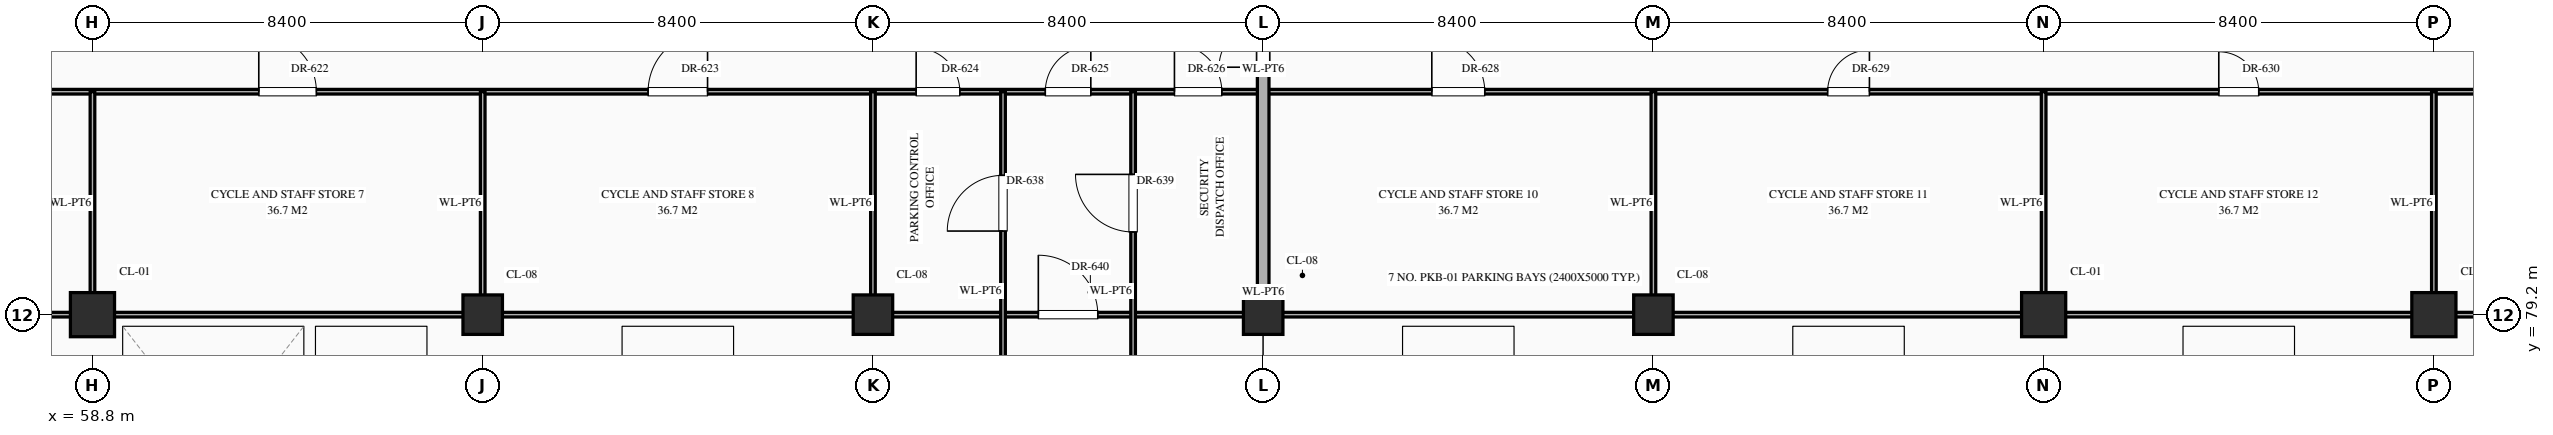
"""IFC4 building model, lengths in metres.
Left out: names, types, materials, properties, quantities, classifications, styles, units other than length and angle.
Written with IfcOpenShell. Run it as: python <this file> out.ifc"""

import sys

from ifc_helpers import new_model, si_unit, direction, frame, frame_2d, origin, origin_2d, place, context, subcontext, project, spatial, rectangle, circle, extrude, element, fill, save


model = new_model("IFC4")
c1 = context("Model", 3, precision=1e-05, world=origin(), true_north=direction((0.0, 1.0)))
c2 = subcontext(c1, "Body", "Model", "MODEL_VIEW")
j1 = project(units=[si_unit("LENGTHUNIT", "METRE"), si_unit("PLANEANGLEUNIT", "RADIAN")], contexts=[c1])
p1 = place(None, origin())
s1 = spatial("IfcSite", under=j1, at=p1, CompositionType="ELEMENT")
p2 = place(p1, origin())
s2 = spatial("IfcBuilding", under=s1, at=p2, CompositionType="ELEMENT")
p3 = place(p2, frame((0.0, 0.0, -5.4)))
s3 = spatial("IfcBuildingStorey", under=s2, at=p3, CompositionType="ELEMENT", Elevation=-5.4)
p4 = place(p3, frame((58.8, 79.2, 0.0), z_axis=(0.0, 0.0, 1.0), x_axis=(1.0, 0.0, 0.0)))
e1 = element("IfcColumn", 1, at=p4, inside=s3, PredefinedType="COLUMN", context=c2, shape_type="SweptSolid", body=[
    extrude(rectangle(XDim=0.95, YDim=0.95, at=origin_2d()), origin(), (0.0, 0.0, 1.0), 5.4),
])
for number, where, z_axis, x_axis in (
    (2, (67.2, 79.2, 0.0), (0.0, 0.0, 1.0), (1.0, 0.0, 0.0)),
    (3, (75.6, 79.2, 0.0), (0.0, 0.0, 1.0), (1.0, 0.0, 0.0)),
    (4, (84.0, 79.2, 0.0), (0.0, 0.0, 1.0), (1.0, 0.0, 0.0)),
    (5, (92.4, 79.2, 0.0), (0.0, 0.0, 1.0), (1.0, 0.0, 0.0)),
):
    element("IfcColumn", number, at=place(p3, frame(where, z_axis=z_axis, x_axis=x_axis)), inside=s3, PredefinedType="COLUMN", context=c2, shape_type="SweptSolid", body=[
        extrude(circle(Radius=0.425, at=origin_2d()), origin(), (0.0, 0.0, 1.0), 5.4),
    ])
for number, where, z_axis, x_axis in (
    (6, (100.8, 79.2, 0.0), (0.0, 0.0, 1.0), (1.0, 0.0, 0.0)),
    (7, (109.2, 79.2, 0.0), (0.0, 0.0, 1.0), (1.0, 0.0, 0.0)),
):
    element("IfcColumn", number, at=place(p3, frame(where, z_axis=z_axis, x_axis=x_axis)), inside=s3, PredefinedType="COLUMN", context=c2, shape_type="SweptSolid", body=[
        extrude(rectangle(XDim=0.95, YDim=0.95, at=origin_2d()), origin(), (0.0, 0.0, 1.0), 5.4),
    ])
p5 = place(p3, frame((50.4, 79.2, 0.0), z_axis=(0.0, 0.0, 1.0), x_axis=(1.0, 0.0, 0.0)))
e8 = element("IfcWall", 8, at=p5, inside=s3, PredefinedType="STANDARD", context=c2, shape_type="SweptSolid", body=[
    extrude(rectangle(XDim=100.8, YDim=0.1, at=frame_2d((50.4, 0.0))), origin(), (0.0, 0.0, 1.0), 4.13),
])
p6 = place(p5, frame((28.76, 0.0, 0.0)))
e9 = element("IfcOpeningElement", 9, at=p6, cuts=e8, PredefinedType="OPENING", context=c2, shape_type="SweptSolid", body=[
    extrude(rectangle(XDim=1.28, YDim=2.35, at=frame_2d((0.64, 1.175))), frame((0.0, 0.062, 0.0), z_axis=(0.0, -1.0, 0.0), x_axis=(1.0, 0.0, 0.0)), (0.0, 0.0, 1.0), 0.124),
])
p7 = place(p3, frame((33.6, 84.0, 0.0), z_axis=(0.0, 0.0, 1.0), x_axis=(1.0, 0.0, 0.0)))
e10 = element("IfcWall", 10, at=p7, inside=s3, PredefinedType="STANDARD", context=c2, shape_type="SweptSolid", body=[
    extrude(rectangle(XDim=117.6, YDim=0.1, at=frame_2d((58.8, 0.0))), origin(), (0.0, 0.0, 1.0), 5.1),
])
p8 = place(p7, frame((3.66, 0.0, 0.0)))
e11 = element("IfcOpeningElement", 11, at=p8, cuts=e10, PredefinedType="OPENING", context=c2, shape_type="SweptSolid", body=[
    extrude(rectangle(XDim=1.08, YDim=2.25, at=frame_2d((0.54, 1.125))), frame((0.0, 0.062, 0.0), z_axis=(0.0, -1.0, 0.0), x_axis=(1.0, 0.0, 0.0)), (0.0, 0.0, 1.0), 0.124),
])
p9 = place(p7, frame((12.04, 0.0, 0.0)))
e12 = element("IfcOpeningElement", 12, at=p9, cuts=e10, PredefinedType="OPENING", context=c2, shape_type="SweptSolid", body=[
    extrude(rectangle(XDim=1.12, YDim=2.25, at=frame_2d((0.56, 1.125))), frame((0.0, 0.062, 0.0), z_axis=(0.0, -1.0, 0.0), x_axis=(1.0, 0.0, 0.0)), (0.0, 0.0, 1.0), 0.124),
])
p10 = place(p7, frame((20.4, 0.0, 0.0)))
e13 = element("IfcOpeningElement", 13, at=p10, cuts=e10, PredefinedType="OPENING", context=c2, shape_type="SweptSolid", body=[
    extrude(rectangle(XDim=1.2, YDim=2.35, at=frame_2d((0.6, 1.175))), frame((0.0, 0.062, 0.0), z_axis=(0.0, -1.0, 0.0), x_axis=(1.0, 0.0, 0.0)), (0.0, 0.0, 1.0), 0.124),
])
p11 = place(p7, frame((28.78, 0.0, 0.0)))
e14 = element("IfcOpeningElement", 14, at=p11, cuts=e10, PredefinedType="OPENING", context=c2, shape_type="SweptSolid", body=[
    extrude(rectangle(XDim=1.24, YDim=2.3, at=frame_2d((0.62, 1.15))), frame((0.0, 0.062, 0.0), z_axis=(0.0, -1.0, 0.0), x_axis=(1.0, 0.0, 0.0)), (0.0, 0.0, 1.0), 0.124),
])
p12 = place(p7, frame((37.16, 0.0, 0.0)))
e15 = element("IfcOpeningElement", 15, at=p12, cuts=e10, PredefinedType="OPENING", context=c2, shape_type="SweptSolid", body=[
    extrude(rectangle(XDim=1.28, YDim=2.35, at=frame_2d((0.64, 1.175))), frame((0.0, 0.062, 0.0), z_axis=(0.0, -1.0, 0.0), x_axis=(1.0, 0.0, 0.0)), (0.0, 0.0, 1.0), 0.124),
])
p13 = place(p7, frame((42.93, 0.0, 0.0)))
e16 = element("IfcOpeningElement", 16, at=p13, cuts=e10, PredefinedType="OPENING", context=c2, shape_type="SweptSolid", body=[
    extrude(rectangle(XDim=0.94, YDim=2.3, at=frame_2d((0.47, 1.15))), frame((0.0, 0.062, 0.0), z_axis=(0.0, -1.0, 0.0), x_axis=(1.0, 0.0, 0.0)), (0.0, 0.0, 1.0), 0.124),
])
p14 = place(p7, frame((45.71, 0.0, 0.0)))
e17 = element("IfcOpeningElement", 17, at=p14, cuts=e10, PredefinedType="OPENING", context=c2, shape_type="SweptSolid", body=[
    extrude(rectangle(XDim=0.98, YDim=2.35, at=frame_2d((0.49, 1.175))), frame((0.0, 0.062, 0.0), z_axis=(0.0, -1.0, 0.0), x_axis=(1.0, 0.0, 0.0)), (0.0, 0.0, 1.0), 0.124),
])
p15 = place(p7, frame((48.49, 0.0, 0.0)))
e18 = element("IfcOpeningElement", 18, at=p15, cuts=e10, PredefinedType="OPENING", context=c2, shape_type="SweptSolid", body=[
    extrude(rectangle(XDim=1.02, YDim=2.4, at=frame_2d((0.51, 1.2))), frame((0.0, 0.062, 0.0), z_axis=(0.0, -1.0, 0.0), x_axis=(1.0, 0.0, 0.0)), (0.0, 0.0, 1.0), 0.124),
])
p16 = place(p7, frame((54.03, 0.0, 0.0)))
e19 = element("IfcOpeningElement", 19, at=p16, cuts=e10, PredefinedType="OPENING", context=c2, shape_type="SweptSolid", body=[
    extrude(rectangle(XDim=1.14, YDim=2.4, at=frame_2d((0.57, 1.2))), frame((0.0, 0.062, 0.0), z_axis=(0.0, -1.0, 0.0), x_axis=(1.0, 0.0, 0.0)), (0.0, 0.0, 1.0), 0.124),
])
p17 = place(p7, frame((62.55, 0.0, 0.0)))
e20 = element("IfcOpeningElement", 20, at=p17, cuts=e10, PredefinedType="OPENING", context=c2, shape_type="SweptSolid", body=[
    extrude(rectangle(XDim=0.9, YDim=2.15, at=frame_2d((0.45, 1.075))), frame((0.0, 0.062, 0.0), z_axis=(0.0, -1.0, 0.0), x_axis=(1.0, 0.0, 0.0)), (0.0, 0.0, 1.0), 0.124),
])
p18 = place(p7, frame((70.97, 0.0, 0.0)))
e21 = element("IfcOpeningElement", 21, at=p18, cuts=e10, PredefinedType="OPENING", context=c2, shape_type="SweptSolid", body=[
    extrude(rectangle(XDim=0.86, YDim=2.1, at=frame_2d((0.43, 1.05))), frame((0.0, 0.062, 0.0), z_axis=(0.0, -1.0, 0.0), x_axis=(1.0, 0.0, 0.0)), (0.0, 0.0, 1.0), 0.124),
])
p19 = place(p7, frame((79.34, 0.0, 0.0)))
e22 = element("IfcOpeningElement", 22, at=p19, cuts=e10, PredefinedType="OPENING", context=c2, shape_type="SweptSolid", body=[
    extrude(rectangle(XDim=0.92, YDim=2.15, at=frame_2d((0.46, 1.075))), frame((0.0, 0.062, 0.0), z_axis=(0.0, -1.0, 0.0), x_axis=(1.0, 0.0, 0.0)), (0.0, 0.0, 1.0), 0.124),
])
p20 = place(p7, frame((87.72, 0.0, 0.0)))
e23 = element("IfcOpeningElement", 23, at=p20, cuts=e10, PredefinedType="OPENING", context=c2, shape_type="SweptSolid", body=[
    extrude(rectangle(XDim=0.96, YDim=2.2, at=frame_2d((0.48, 1.1))), frame((0.0, 0.062, 0.0), z_axis=(0.0, -1.0, 0.0), x_axis=(1.0, 0.0, 0.0)), (0.0, 0.0, 1.0), 0.124),
])
p21 = place(p7, frame((96.1, 0.0, 0.0)))
e24 = element("IfcOpeningElement", 24, at=p21, cuts=e10, PredefinedType="OPENING", context=c2, shape_type="SweptSolid", body=[
    extrude(rectangle(XDim=1.0, YDim=2.25, at=frame_2d((0.5, 1.125))), frame((0.0, 0.062, 0.0), z_axis=(0.0, -1.0, 0.0), x_axis=(1.0, 0.0, 0.0)), (0.0, 0.0, 1.0), 0.124),
])
p22 = place(p7, frame((104.48, 0.0, 0.0)))
e25 = element("IfcOpeningElement", 25, at=p22, cuts=e10, PredefinedType="OPENING", context=c2, shape_type="SweptSolid", body=[
    extrude(rectangle(XDim=1.04, YDim=2.2, at=frame_2d((0.52, 1.1))), frame((0.0, 0.062, 0.0), z_axis=(0.0, -1.0, 0.0), x_axis=(1.0, 0.0, 0.0)), (0.0, 0.0, 1.0), 0.124),
])
p23 = place(p7, frame((112.86, 0.0, 0.0)))
e26 = element("IfcOpeningElement", 26, at=p23, cuts=e10, PredefinedType="OPENING", context=c2, shape_type="SweptSolid", body=[
    extrude(rectangle(XDim=1.08, YDim=2.25, at=frame_2d((0.54, 1.125))), frame((0.0, 0.062, 0.0), z_axis=(0.0, -1.0, 0.0), x_axis=(1.0, 0.0, 0.0)), (0.0, 0.0, 1.0), 0.124),
])
for number, where, z_axis, x_axis in (
    (27, (58.8, 79.2, 0.0), (0.0, 0.0, 1.0), (0.0, 1.0, 0.0)),
    (28, (67.2, 79.2, 0.0), (0.0, 0.0, 1.0), (0.0, 1.0, 0.0)),
    (29, (75.6, 79.2, 0.0), (0.0, 0.0, 1.0), (0.0, 1.0, 0.0)),
):
    element("IfcWall", number, at=place(p3, frame(where, z_axis=z_axis, x_axis=x_axis)), inside=s3, PredefinedType="STANDARD", context=c2, shape_type="SweptSolid", body=[
        extrude(rectangle(XDim=4.8, YDim=0.1, at=frame_2d((2.4, 0.0))), origin(), (0.0, 0.0, 1.0), 4.35),
    ])
p24 = place(p3, frame((78.4, 0.04, 0.0), z_axis=(0.0, 0.0, 1.0), x_axis=(0.0, 1.0, 0.0)))
e30 = element("IfcWall", 30, at=p24, inside=s3, PredefinedType="STANDARD", context=c2, shape_type="SweptSolid", body=[
    extrude(rectangle(XDim=83.96, YDim=0.1, at=frame_2d((41.98, 0.0))), origin(), (0.0, 0.0, 1.0), 4.98),
])
p25 = place(p24, frame((80.96, 0.0, 0.0)))
e31 = element("IfcOpeningElement", 31, at=p25, cuts=e30, PredefinedType="OPENING", context=c2, shape_type="SweptSolid", body=[
    extrude(rectangle(XDim=1.2, YDim=2.35, at=frame_2d((0.6, 1.175))), frame((0.0, 0.062, 0.0), z_axis=(0.0, -1.0, 0.0), x_axis=(1.0, 0.0, 0.0)), (0.0, 0.0, 1.0), 0.124),
])
p26 = place(p24, frame((41.49, 0.0, 0.0)))
e32 = element("IfcOpeningElement", 32, at=p26, cuts=e30, PredefinedType="OPENING", context=c2, shape_type="SweptSolid", body=[
    extrude(rectangle(XDim=0.94, YDim=2.3, at=frame_2d((0.47, 1.15))), frame((0.0, 0.062, 0.0), z_axis=(0.0, -1.0, 0.0), x_axis=(1.0, 0.0, 0.0)), (0.0, 0.0, 1.0), 0.124),
])
p27 = place(p24, frame((17.47, 0.0, 0.0)))
e33 = element("IfcOpeningElement", 33, at=p27, cuts=e30, PredefinedType="OPENING", context=c2, shape_type="SweptSolid", body=[
    extrude(rectangle(XDim=1.02, YDim=2.4, at=frame_2d((0.51, 1.2))), frame((0.0, 0.062, 0.0), z_axis=(0.0, -1.0, 0.0), x_axis=(1.0, 0.0, 0.0)), (0.0, 0.0, 1.0), 0.124),
])
p28 = place(p24, frame((37.83, 0.0, 0.0)))
e34 = element("IfcOpeningElement", 34, at=p28, cuts=e30, PredefinedType="OPENING", context=c2, shape_type="SweptSolid", body=[
    extrude(rectangle(XDim=1.06, YDim=2.4, at=frame_2d((0.53, 1.2))), frame((0.0, 0.062, 0.0), z_axis=(0.0, -1.0, 0.0), x_axis=(1.0, 0.0, 0.0)), (0.0, 0.0, 1.0), 0.124),
])
p29 = place(p24, frame((60.73, 0.0, 0.0)))
e35 = element("IfcOpeningElement", 35, at=p29, cuts=e30, PredefinedType="OPENING", context=c2, shape_type="SweptSolid", body=[
    extrude(rectangle(XDim=0.86, YDim=2.1, at=frame_2d((0.43, 1.05))), frame((0.0, 0.062, 0.0), z_axis=(0.0, -1.0, 0.0), x_axis=(1.0, 0.0, 0.0)), (0.0, 0.0, 1.0), 0.124),
])
p30 = place(p3, frame((81.2, 0.04, 0.0), z_axis=(0.0, 0.0, 1.0), x_axis=(0.0, 1.0, 0.0)))
e36 = element("IfcWall", 36, at=p30, inside=s3, PredefinedType="STANDARD", context=c2, shape_type="SweptSolid", body=[
    extrude(rectangle(XDim=83.96, YDim=0.1, at=frame_2d((41.98, 0.0))), origin(), (0.0, 0.0, 1.0), 4.98),
])
p31 = place(p30, frame((80.94, 0.0, 0.0)))
e37 = element("IfcOpeningElement", 37, at=p31, cuts=e36, PredefinedType="OPENING", context=c2, shape_type="SweptSolid", body=[
    extrude(rectangle(XDim=1.24, YDim=2.3, at=frame_2d((0.62, 1.15))), frame((0.0, 0.062, 0.0), z_axis=(0.0, -1.0, 0.0), x_axis=(1.0, 0.0, 0.0)), (0.0, 0.0, 1.0), 0.124),
])
p32 = place(p30, frame((41.47, 0.0, 0.0)))
e38 = element("IfcOpeningElement", 38, at=p32, cuts=e36, PredefinedType="OPENING", context=c2, shape_type="SweptSolid", body=[
    extrude(rectangle(XDim=0.98, YDim=2.35, at=frame_2d((0.49, 1.175))), frame((0.0, 0.062, 0.0), z_axis=(0.0, -1.0, 0.0), x_axis=(1.0, 0.0, 0.0)), (0.0, 0.0, 1.0), 0.124),
])
p33 = place(p30, frame((17.41, 0.0, 0.0)))
e39 = element("IfcOpeningElement", 39, at=p33, cuts=e36, PredefinedType="OPENING", context=c2, shape_type="SweptSolid", body=[
    extrude(rectangle(XDim=1.14, YDim=2.4, at=frame_2d((0.57, 1.2))), frame((0.0, 0.062, 0.0), z_axis=(0.0, -1.0, 0.0), x_axis=(1.0, 0.0, 0.0)), (0.0, 0.0, 1.0), 0.124),
])
p34 = place(p30, frame((37.91, 0.0, 0.0)))
e40 = element("IfcOpeningElement", 40, at=p34, cuts=e36, PredefinedType="OPENING", context=c2, shape_type="SweptSolid", body=[
    extrude(rectangle(XDim=0.9, YDim=2.15, at=frame_2d((0.45, 1.075))), frame((0.0, 0.062, 0.0), z_axis=(0.0, -1.0, 0.0), x_axis=(1.0, 0.0, 0.0)), (0.0, 0.0, 1.0), 0.124),
])
p35 = place(p30, frame((60.7, 0.0, 0.0)))
e41 = element("IfcOpeningElement", 41, at=p35, cuts=e36, PredefinedType="OPENING", context=c2, shape_type="SweptSolid", body=[
    extrude(rectangle(XDim=0.92, YDim=2.15, at=frame_2d((0.46, 1.075))), frame((0.0, 0.062, 0.0), z_axis=(0.0, -1.0, 0.0), x_axis=(1.0, 0.0, 0.0)), (0.0, 0.0, 1.0), 0.124),
])
p36 = place(p3, frame((84.0, 79.2, 0.0), z_axis=(0.0, 0.0, 1.0), x_axis=(0.0, 1.0, 0.0)))
e42 = element("IfcWall", 42, at=p36, inside=s3, PredefinedType="STANDARD", context=c2, shape_type="SweptSolid", body=[
    extrude(rectangle(XDim=35.96, YDim=0.25, at=frame_2d((17.98, 0.0))), origin(), (0.0, 0.0, 1.0), 4.35),
])
p37 = place(p36, frame((22.798, 0.0, 0.0)))
e43 = element("IfcOpeningElement", 43, at=p37, cuts=e42, PredefinedType="OPENING", context=c2, shape_type="SweptSolid", body=[
    extrude(rectangle(XDim=1.6, YDim=2.3, at=frame_2d((0.8, 1.15))), frame((0.0, 0.137, 0.0), z_axis=(0.0, -1.0, 0.0), x_axis=(1.0, 0.0, 0.0)), (0.0, 0.0, 1.0), 0.274),
])
p38 = place(p36, frame((12.528, 0.0, 0.0)))
e44 = element("IfcOpeningElement", 44, at=p38, cuts=e42, PredefinedType="OPENING", context=c2, shape_type="SweptSolid", body=[
    extrude(rectangle(XDim=0.95, YDim=2.15, at=frame_2d((0.475, 1.075))), frame((0.0, 0.137, 0.0), z_axis=(0.0, -1.0, 0.0), x_axis=(1.0, 0.0, 0.0)), (0.0, 0.0, 1.0), 0.274),
])
p39 = place(p36, frame((15.323, 0.0, 0.0)))
e45 = element("IfcOpeningElement", 45, at=p39, cuts=e42, PredefinedType="OPENING", context=c2, shape_type="SweptSolid", body=[
    extrude(rectangle(XDim=0.95, YDim=2.15, at=frame_2d((0.475, 1.075))), frame((0.0, 0.137, 0.0), z_axis=(0.0, -1.0, 0.0), x_axis=(1.0, 0.0, 0.0)), (0.0, 0.0, 1.0), 0.274),
])
p40 = place(p36, frame((25.903, 0.0, 0.0)))
e46 = element("IfcOpeningElement", 46, at=p40, cuts=e42, PredefinedType="OPENING", context=c2, shape_type="SweptSolid", body=[
    extrude(rectangle(XDim=1.8, YDim=2.35, at=frame_2d((0.9, 1.175))), frame((0.0, 0.137, 0.0), z_axis=(0.0, -1.0, 0.0), x_axis=(1.0, 0.0, 0.0)), (0.0, 0.0, 1.0), 0.274),
])
p41 = place(p36, frame((29.722, 0.0, 0.0)))
e47 = element("IfcOpeningElement", 47, at=p41, cuts=e42, PredefinedType="OPENING", context=c2, shape_type="SweptSolid", body=[
    extrude(rectangle(XDim=0.95, YDim=2.15, at=frame_2d((0.475, 1.075))), frame((0.0, 0.137, 0.0), z_axis=(0.0, -1.0, 0.0), x_axis=(1.0, 0.0, 0.0)), (0.0, 0.0, 1.0), 0.274),
])
p42 = place(p36, frame((5.327, 0.0, 0.0)))
e48 = element("IfcOpeningElement", 48, at=p42, cuts=e42, PredefinedType="OPENING", context=c2, shape_type="SweptSolid", body=[
    extrude(rectangle(XDim=0.95, YDim=2.15, at=frame_2d((0.475, 1.075))), frame((0.0, 0.137, 0.0), z_axis=(0.0, -1.0, 0.0), x_axis=(1.0, 0.0, 0.0)), (0.0, 0.0, 1.0), 0.274),
])
for number, where, z_axis, x_axis in (
    (49, (92.4, 79.2, 0.0), (0.0, 0.0, 1.0), (0.0, 1.0, 0.0)),
    (50, (100.8, 79.2, 0.0), (0.0, 0.0, 1.0), (0.0, 1.0, 0.0)),
    (51, (109.2, 79.2, 0.0), (0.0, 0.0, 1.0), (0.0, 1.0, 0.0)),
):
    element("IfcWall", number, at=place(p3, frame(where, z_axis=z_axis, x_axis=x_axis)), inside=s3, PredefinedType="STANDARD", context=c2, shape_type="SweptSolid", body=[
        extrude(rectangle(XDim=4.8, YDim=0.1, at=frame_2d((2.4, 0.0))), origin(), (0.0, 0.0, 1.0), 4.35),
    ])
p43 = place(p42, origin())
e52 = element("IfcDoor", 52, at=p43, inside=s3, OperationType="SINGLE_SWING_LEFT", PredefinedType="DOOR", context=c2, shape_type="SweptSolid", body=[
    extrude(rectangle(XDim=0.95, YDim=2.15, at=frame_2d((0.475, 1.075))), frame((0.0, 0.025, 0.0), z_axis=(0.0, -1.0, 0.0), x_axis=(1.0, 0.0, 0.0)), (0.0, 0.0, 1.0), 0.05),
])
fill(e48, e52)
p44 = place(p11, origin())
e53 = element("IfcDoor", 53, at=p44, inside=s3, OperationType="SINGLE_SWING_LEFT", PredefinedType="DOOR", context=c2, shape_type="SweptSolid", body=[
    extrude(rectangle(XDim=1.24, YDim=2.3, at=frame_2d((0.62, 1.15))), frame((0.0, 0.025, 0.0), z_axis=(0.0, -1.0, 0.0), x_axis=(1.0, 0.0, 0.0)), (0.0, 0.0, 1.0), 0.05),
])
fill(e14, e53)
p45 = place(p12, origin())
e54 = element("IfcDoor", 54, at=p45, inside=s3, OperationType="SINGLE_SWING_RIGHT", PredefinedType="DOOR", context=c2, shape_type="SweptSolid", body=[
    extrude(rectangle(XDim=1.28, YDim=2.35, at=frame_2d((0.64, 1.175))), frame((0.0, 0.025, 0.0), z_axis=(0.0, -1.0, 0.0), x_axis=(1.0, 0.0, 0.0)), (0.0, 0.0, 1.0), 0.05),
])
fill(e15, e54)
p46 = place(p13, origin())
e55 = element("IfcDoor", 55, at=p46, inside=s3, OperationType="SINGLE_SWING_LEFT", PredefinedType="DOOR", context=c2, shape_type="SweptSolid", body=[
    extrude(rectangle(XDim=0.94, YDim=2.3, at=frame_2d((0.47, 1.15))), frame((0.0, 0.025, 0.0), z_axis=(0.0, -1.0, 0.0), x_axis=(1.0, 0.0, 0.0)), (0.0, 0.0, 1.0), 0.05),
])
fill(e16, e55)
p47 = place(p14, origin())
e56 = element("IfcDoor", 56, at=p47, inside=s3, OperationType="SINGLE_SWING_RIGHT", PredefinedType="DOOR", context=c2, shape_type="SweptSolid", body=[
    extrude(rectangle(XDim=0.98, YDim=2.35, at=frame_2d((0.49, 1.175))), frame((0.0, 0.025, 0.0), z_axis=(0.0, -1.0, 0.0), x_axis=(1.0, 0.0, 0.0)), (0.0, 0.0, 1.0), 0.05),
])
fill(e17, e56)
p48 = place(p15, origin())
e57 = element("IfcDoor", 57, at=p48, inside=s3, OperationType="SINGLE_SWING_LEFT", PredefinedType="DOOR", context=c2, shape_type="SweptSolid", body=[
    extrude(rectangle(XDim=1.02, YDim=2.4, at=frame_2d((0.51, 1.2))), frame((0.0, 0.025, 0.0), z_axis=(0.0, -1.0, 0.0), x_axis=(1.0, 0.0, 0.0)), (0.0, 0.0, 1.0), 0.05),
])
fill(e18, e57)
p49 = place(p16, origin())
e58 = element("IfcDoor", 58, at=p49, inside=s3, OperationType="SINGLE_SWING_LEFT", PredefinedType="DOOR", context=c2, shape_type="SweptSolid", body=[
    extrude(rectangle(XDim=1.14, YDim=2.4, at=frame_2d((0.57, 1.2))), frame((0.0, 0.025, 0.0), z_axis=(0.0, -1.0, 0.0), x_axis=(1.0, 0.0, 0.0)), (0.0, 0.0, 1.0), 0.05),
])
fill(e19, e58)
p50 = place(p17, origin())
e59 = element("IfcDoor", 59, at=p50, inside=s3, OperationType="SINGLE_SWING_RIGHT", PredefinedType="DOOR", context=c2, shape_type="SweptSolid", body=[
    extrude(rectangle(XDim=0.9, YDim=2.15, at=frame_2d((0.45, 1.075))), frame((0.0, 0.025, 0.0), z_axis=(0.0, -1.0, 0.0), x_axis=(1.0, 0.0, 0.0)), (0.0, 0.0, 1.0), 0.05),
])
fill(e20, e59)
p51 = place(p18, origin())
e60 = element("IfcDoor", 60, at=p51, inside=s3, OperationType="SINGLE_SWING_LEFT", PredefinedType="DOOR", context=c2, shape_type="SweptSolid", body=[
    extrude(rectangle(XDim=0.86, YDim=2.1, at=frame_2d((0.43, 1.05))), frame((0.0, 0.025, 0.0), z_axis=(0.0, -1.0, 0.0), x_axis=(1.0, 0.0, 0.0)), (0.0, 0.0, 1.0), 0.05),
])
fill(e21, e60)
p52 = place(p25, origin())
e61 = element("IfcDoor", 61, at=p52, inside=s3, OperationType="SINGLE_SWING_LEFT", PredefinedType="DOOR", context=c2, shape_type="SweptSolid", body=[
    extrude(rectangle(XDim=1.2, YDim=2.35, at=frame_2d((0.6, 1.175))), frame((0.0, 0.025, 0.0), z_axis=(0.0, -1.0, 0.0), x_axis=(1.0, 0.0, 0.0)), (0.0, 0.0, 1.0), 0.05),
])
fill(e31, e61)
p53 = place(p31, origin())
e62 = element("IfcDoor", 62, at=p53, inside=s3, OperationType="SINGLE_SWING_RIGHT", PredefinedType="DOOR", context=c2, shape_type="SweptSolid", body=[
    extrude(rectangle(XDim=1.24, YDim=2.3, at=frame_2d((0.62, 1.15))), frame((0.0, 0.025, 0.0), z_axis=(0.0, -1.0, 0.0), x_axis=(1.0, 0.0, 0.0)), (0.0, 0.0, 1.0), 0.05),
])
fill(e37, e62)
p54 = place(p6, origin())
e63 = element("IfcDoor", 63, at=p54, inside=s3, OperationType="SINGLE_SWING_LEFT", PredefinedType="DOOR", context=c2, shape_type="SweptSolid", body=[
    extrude(rectangle(XDim=1.28, YDim=2.35, at=frame_2d((0.64, 1.175))), frame((0.0, 0.025, 0.0), z_axis=(0.0, -1.0, 0.0), x_axis=(1.0, 0.0, 0.0)), (0.0, 0.0, 1.0), 0.05),
])
fill(e9, e63)
save(model, sys.argv[1])
